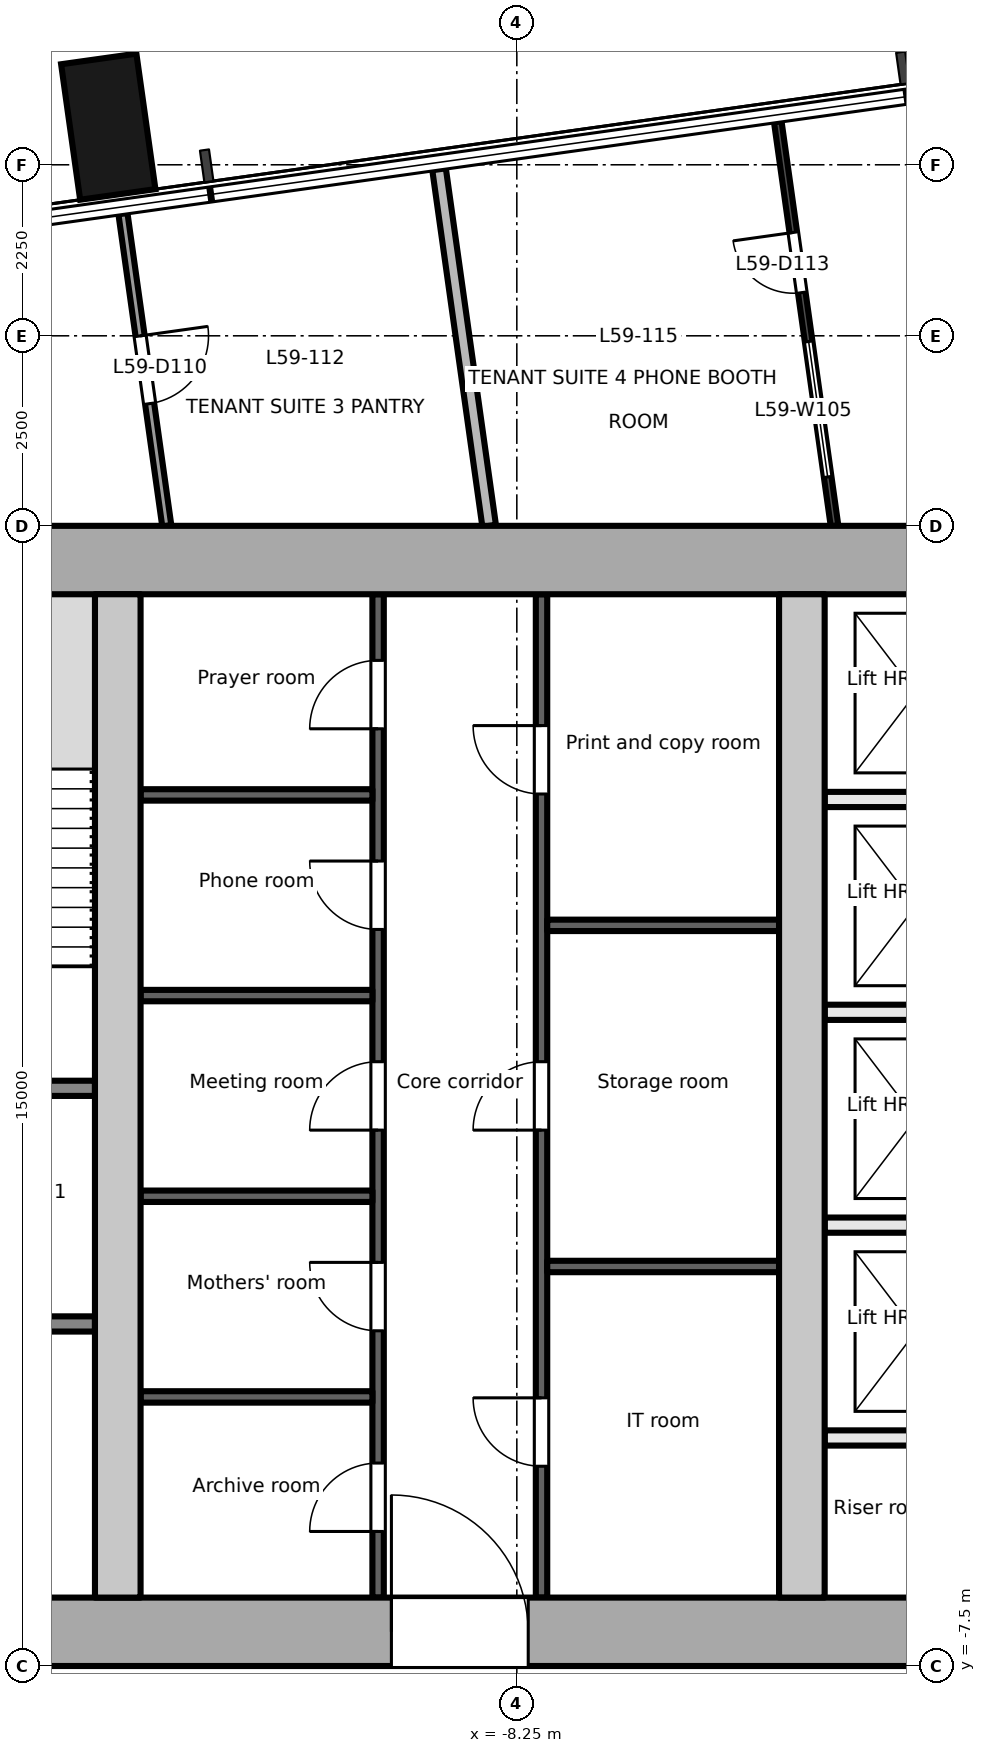
"""IFC4 building model, lengths in metres.
Left out: names, types, materials, properties, quantities, classifications, styles, units other than length and angle.
Written with IfcOpenShell. Run it as: python <this file> out.ifc"""

import sys

from ifc_helpers import new_model, si_unit, direction, frame, frame_2d, origin, origin_2d, place, context, subcontext, project, spatial, rectangle, extrude, element, fill, save


model = new_model("IFC4")
c1 = context("Model", 3, precision=1e-05, world=origin(), true_north=direction((0.0, 1.0)))
c2 = subcontext(c1, "Body", "Model", "MODEL_VIEW")
j1 = project(units=[si_unit("LENGTHUNIT", "METRE"), si_unit("PLANEANGLEUNIT", "RADIAN")], contexts=[c1])
p1 = place(None, origin())
s1 = spatial("IfcSite", under=j1, at=p1, CompositionType="ELEMENT")
p2 = place(p1, origin())
s2 = spatial("IfcBuilding", under=s1, at=p2, CompositionType="ELEMENT")
p3 = place(p2, frame((0.0, 0.0, 259.0)))
s3 = spatial("IfcBuildingStorey", under=s2, at=p3, CompositionType="ELEMENT", Elevation=259.0)
p4 = place(p3, frame((-13.625, 12.751, -0.2), z_axis=(0.0, 0.0, 1.0), x_axis=(0.990265639562, 0.139190384377, 0.0)))
e1 = element("IfcColumn", 1, at=p4, inside=s3, PredefinedType="COLUMN", context=c2, shape_type="SweptSolid", body=[
    extrude(rectangle(XDim=1.0, YDim=1.8, at=origin_2d()), origin(), (0.0, 0.0, 1.0), 3.9),
])
p5 = place(p3, frame((-18.0, -7.05, -0.2), z_axis=(0.0, 0.0, 1.0), x_axis=(1.0, 0.0, 0.0)))
e2 = element("IfcWall", 2, at=p5, inside=s3, PredefinedType="SHEAR", context=c2, shape_type="SweptSolid", body=[
    extrude(rectangle(XDim=36.0, YDim=0.9, at=frame_2d((18.0, 0.0))), origin(), (0.0, 0.0, 1.0), 3.9),
])
p6 = place(p5, frame((8.1, 0.0, 0.2)))
e3 = element("IfcOpeningElement", 3, at=p6, cuts=e2, PredefinedType="OPENING", context=c2, shape_type="SweptSolid", body=[
    extrude(rectangle(XDim=1.8, YDim=2.1, at=frame_2d((0.9, 1.05))), frame((0.0, 0.46, 0.0), z_axis=(0.0, -1.0, 0.0), x_axis=(1.0, 0.0, 0.0)), (0.0, 0.0, 1.0), 0.921),
])
p7 = place(p5, frame((16.8, 0.0, 0.2)))
e4 = element("IfcOpeningElement", 4, at=p7, cuts=e2, PredefinedType="OPENING", context=c2, shape_type="SweptSolid", body=[
    extrude(rectangle(XDim=2.4, YDim=2.1, at=frame_2d((1.2, 1.05))), frame((0.0, 0.46, 0.0), z_axis=(0.0, -1.0, 0.0), x_axis=(1.0, 0.0, 0.0)), (0.0, 0.0, 1.0), 0.921),
])
p8 = place(p5, frame((26.1, 0.0, 0.2)))
e5 = element("IfcOpeningElement", 5, at=p8, cuts=e2, PredefinedType="OPENING", context=c2, shape_type="SweptSolid", body=[
    extrude(rectangle(XDim=2.4, YDim=2.1, at=frame_2d((1.2, 1.05))), frame((0.0, 0.46, 0.0), z_axis=(0.0, -1.0, 0.0), x_axis=(1.0, 0.0, 0.0)), (0.0, 0.0, 1.0), 0.921),
])
p9 = place(p3, frame((-18.0, 7.05, -0.2), z_axis=(0.0, 0.0, 1.0), x_axis=(1.0, 0.0, 0.0)))
e6 = element("IfcWall", 6, at=p9, inside=s3, PredefinedType="SHEAR", context=c2, shape_type="SweptSolid", body=[
    extrude(rectangle(XDim=36.0, YDim=0.9, at=frame_2d((18.0, 0.0))), origin(), (0.0, 0.0, 1.0), 3.9),
])
for number, where, z_axis, x_axis in (
    (7, (-13.5, -6.6, -0.2), (0.0, 0.0, 1.0), (0.0, 1.0, 0.0)),
    (8, (-4.5, -6.6, -0.2), (0.0, 0.0, 1.0), (0.0, 1.0, 0.0)),
):
    element("IfcWall", number, at=place(p3, frame(where, z_axis=z_axis, x_axis=x_axis)), inside=s3, PredefinedType="SHEAR", context=c2, shape_type="SweptSolid", body=[
        extrude(rectangle(XDim=13.2, YDim=0.6, at=frame_2d((6.6, 0.0))), origin(), (0.0, 0.0, 1.0), 3.9),
    ])
p10 = place(p3, frame((-17.1, -3.0, 0.0), z_axis=(0.0, 0.0, 1.0), x_axis=(1.0, 0.0, 0.0)))
e9 = element("IfcWall", 9, at=p10, inside=s3, PredefinedType="PARTITIONING", context=c2, shape_type="SweptSolid", body=[
    extrude(rectangle(XDim=3.3, YDim=0.2, at=frame_2d((1.65, 0.0))), origin(), (0.0, 0.0, 1.0), 3.7),
])
p11 = place(p10, frame((1.1, 0.0, 0.0)))
e10 = element("IfcOpeningElement", 10, at=p11, cuts=e9, PredefinedType="OPENING", context=c2, shape_type="SweptSolid", body=[
    extrude(rectangle(XDim=1.1, YDim=2.1, at=frame_2d((0.55, 1.05))), frame((0.0, 0.111, 0.0), z_axis=(0.0, -1.0, 0.0), x_axis=(1.0, 0.0, 0.0)), (0.0, 0.0, 1.0), 0.221),
])
p12 = place(p3, frame((-17.1, 0.1, 0.0), z_axis=(0.0, 0.0, 1.0), x_axis=(1.0, 0.0, 0.0)))
e11 = element("IfcWall", 11, at=p12, inside=s3, PredefinedType="PARTITIONING", context=c2, shape_type="SweptSolid", body=[
    extrude(rectangle(XDim=3.3, YDim=0.2, at=frame_2d((1.65, 0.0))), origin(), (0.0, 0.0, 1.0), 3.7),
])
p13 = place(p12, frame((1.1, 0.0, 0.0)))
e12 = element("IfcOpeningElement", 12, at=p13, cuts=e11, PredefinedType="OPENING", context=c2, shape_type="SweptSolid", body=[
    extrude(rectangle(XDim=1.1, YDim=2.1, at=frame_2d((0.55, 1.05))), frame((0.0, 0.111, 0.0), z_axis=(0.0, -1.0, 0.0), x_axis=(1.0, 0.0, 0.0)), (0.0, 0.0, 1.0), 0.221),
])
p14 = place(p3, frame((-10.075, -6.6, 0.0), z_axis=(0.0, 0.0, 1.0), x_axis=(0.0, 1.0, 0.0)))
e13 = element("IfcWall", 13, at=p14, inside=s3, PredefinedType="PARTITIONING", context=c2, shape_type="SweptSolid", body=[
    extrude(rectangle(XDim=13.2, YDim=0.15, at=frame_2d((6.6, 0.0))), origin(), (0.0, 0.0, 1.0), 3.7),
])
p15 = place(p14, frame((0.87, 0.0, 0.0)))
e14 = element("IfcOpeningElement", 14, at=p15, cuts=e13, PredefinedType="OPENING", context=c2, shape_type="SweptSolid", body=[
    extrude(rectangle(XDim=0.9, YDim=2.1, at=frame_2d((0.45, 1.05))), frame((0.0, 0.085, 0.0), z_axis=(0.0, -1.0, 0.0), x_axis=(1.0, 0.0, 0.0)), (0.0, 0.0, 1.0), 0.171),
])
p16 = place(p14, frame((3.51, 0.0, 0.0)))
e15 = element("IfcOpeningElement", 15, at=p16, cuts=e13, PredefinedType="OPENING", context=c2, shape_type="SweptSolid", body=[
    extrude(rectangle(XDim=0.9, YDim=2.1, at=frame_2d((0.45, 1.05))), frame((0.0, 0.085, 0.0), z_axis=(0.0, -1.0, 0.0), x_axis=(1.0, 0.0, 0.0)), (0.0, 0.0, 1.0), 0.171),
])
p17 = place(p14, frame((6.15, 0.0, 0.0)))
e16 = element("IfcOpeningElement", 16, at=p17, cuts=e13, PredefinedType="OPENING", context=c2, shape_type="SweptSolid", body=[
    extrude(rectangle(XDim=0.9, YDim=2.1, at=frame_2d((0.45, 1.05))), frame((0.0, 0.085, 0.0), z_axis=(0.0, -1.0, 0.0), x_axis=(1.0, 0.0, 0.0)), (0.0, 0.0, 1.0), 0.171),
])
p18 = place(p14, frame((8.79, 0.0, 0.0)))
e17 = element("IfcOpeningElement", 17, at=p18, cuts=e13, PredefinedType="OPENING", context=c2, shape_type="SweptSolid", body=[
    extrude(rectangle(XDim=0.9, YDim=2.1, at=frame_2d((0.45, 1.05))), frame((0.0, 0.085, 0.0), z_axis=(0.0, -1.0, 0.0), x_axis=(1.0, 0.0, 0.0)), (0.0, 0.0, 1.0), 0.171),
])
p19 = place(p14, frame((11.43, 0.0, 0.0)))
e18 = element("IfcOpeningElement", 18, at=p19, cuts=e13, PredefinedType="OPENING", context=c2, shape_type="SweptSolid", body=[
    extrude(rectangle(XDim=0.9, YDim=2.1, at=frame_2d((0.45, 1.05))), frame((0.0, 0.085, 0.0), z_axis=(0.0, -1.0, 0.0), x_axis=(1.0, 0.0, 0.0)), (0.0, 0.0, 1.0), 0.171),
])
for number, where, z_axis, x_axis in (
    (19, (-13.2, -3.96, 0.0), (0.0, 0.0, 1.0), (1.0, 0.0, 0.0)),
    (20, (-13.2, -1.32, 0.0), (0.0, 0.0, 1.0), (1.0, 0.0, 0.0)),
    (21, (-13.2, 1.32, 0.0), (0.0, 0.0, 1.0), (1.0, 0.0, 0.0)),
    (22, (-13.2, 3.96, 0.0), (0.0, 0.0, 1.0), (1.0, 0.0, 0.0)),
):
    element("IfcWall", number, at=place(p3, frame(where, z_axis=z_axis, x_axis=x_axis)), inside=s3, PredefinedType="PARTITIONING", context=c2, shape_type="SweptSolid", body=[
        extrude(rectangle(XDim=3.05, YDim=0.15, at=frame_2d((1.525, 0.0))), origin(), (0.0, 0.0, 1.0), 3.7),
    ])
p20 = place(p3, frame((-7.925, -6.6, 0.0), z_axis=(0.0, 0.0, 1.0), x_axis=(0.0, 1.0, 0.0)))
e23 = element("IfcWall", 23, at=p20, inside=s3, PredefinedType="PARTITIONING", context=c2, shape_type="SweptSolid", body=[
    extrude(rectangle(XDim=13.2, YDim=0.15, at=frame_2d((6.6, 0.0))), origin(), (0.0, 0.0, 1.0), 3.7),
])
p21 = place(p20, frame((1.728, 0.0, 0.0)))
e24 = element("IfcOpeningElement", 24, at=p21, cuts=e23, PredefinedType="OPENING", context=c2, shape_type="SweptSolid", body=[
    extrude(rectangle(XDim=0.9, YDim=2.1, at=frame_2d((0.45, 1.05))), frame((0.0, 0.085, 0.0), z_axis=(0.0, -1.0, 0.0), x_axis=(1.0, 0.0, 0.0)), (0.0, 0.0, 1.0), 0.171),
])
p22 = place(p20, frame((6.15, 0.0, 0.0)))
e25 = element("IfcOpeningElement", 25, at=p22, cuts=e23, PredefinedType="OPENING", context=c2, shape_type="SweptSolid", body=[
    extrude(rectangle(XDim=0.9, YDim=2.1, at=frame_2d((0.45, 1.05))), frame((0.0, 0.085, 0.0), z_axis=(0.0, -1.0, 0.0), x_axis=(1.0, 0.0, 0.0)), (0.0, 0.0, 1.0), 0.171),
])
p23 = place(p20, frame((10.572, 0.0, 0.0)))
e26 = element("IfcOpeningElement", 26, at=p23, cuts=e23, PredefinedType="OPENING", context=c2, shape_type="SweptSolid", body=[
    extrude(rectangle(XDim=0.9, YDim=2.1, at=frame_2d((0.45, 1.05))), frame((0.0, 0.085, 0.0), z_axis=(0.0, -1.0, 0.0), x_axis=(1.0, 0.0, 0.0)), (0.0, 0.0, 1.0), 0.171),
])
for number, where, z_axis, x_axis in (
    (27, (-7.85, -2.244, 0.0), (0.0, 0.0, 1.0), (1.0, 0.0, 0.0)),
    (28, (-7.85, 2.244, 0.0), (0.0, 0.0, 1.0), (1.0, 0.0, 0.0)),
):
    element("IfcWall", number, at=place(p3, frame(where, z_axis=z_axis, x_axis=x_axis)), inside=s3, PredefinedType="PARTITIONING", context=c2, shape_type="SweptSolid", body=[
        extrude(rectangle(XDim=3.05, YDim=0.15, at=frame_2d((1.525, 0.0))), origin(), (0.0, 0.0, 1.0), 3.7),
    ])
for number, where, z_axis, x_axis in (
    (29, (-4.2, -1.7, 0.0), (0.0, 0.0, 1.0), (1.0, 0.0, 0.0)),
    (30, (-4.2, 1.1, 0.0), (0.0, 0.0, 1.0), (1.0, 0.0, 0.0)),
    (31, (-4.2, 3.9, 0.0), (0.0, 0.0, 1.0), (1.0, 0.0, 0.0)),
    (32, (-4.2, -4.5, 0.0), (0.0, 0.0, 1.0), (1.0, 0.0, 0.0)),
):
    element("IfcWall", number, at=place(p3, frame(where, z_axis=z_axis, x_axis=x_axis)), inside=s3, PredefinedType="PARTITIONING", context=c2, shape_type="SweptSolid", body=[
        extrude(rectangle(XDim=2.3, YDim=0.2, at=frame_2d((1.15, 0.0))), origin(), (0.0, 0.0, 1.0), 3.7),
    ])
p24 = place(p3, frame((-13.432, 11.607, 0.0), z_axis=(0.0, 0.0, 1.0), x_axis=(0.139105101842, -0.990277623014, 0.0)))
e33 = element("IfcWall", 33, at=p24, inside=s3, PredefinedType="PARTITIONING", context=c2, shape_type="SweptSolid", body=[
    extrude(rectangle(XDim=4.147, YDim=0.12, at=frame_2d((2.074, 0.0))), origin(), (0.0, 0.0, 1.0), 3.4),
])
p25 = place(p24, frame((1.624, 0.0, 0.0)))
e34 = element("IfcOpeningElement", 34, at=p25, cuts=e33, PredefinedType="OPENING", context=c2, shape_type="SweptSolid", body=[
    extrude(rectangle(XDim=0.9, YDim=2.1, at=frame_2d((0.45, 1.05))), frame((0.0, 0.071, 0.0), z_axis=(0.0, -1.0, 0.0), x_axis=(1.0, 0.0, 0.0)), (0.0, 0.0, 1.0), 0.141),
])
p26 = place(p3, frame((-9.273, 12.191, 0.0), z_axis=(0.0, 0.0, 1.0), x_axis=(0.139104789371, -0.990277666907, 0.0)))
e35 = element("IfcWall", 35, at=p26, inside=s3, PredefinedType="PARTITIONING", context=c2, shape_type="SweptSolid", body=[
    extrude(rectangle(XDim=4.737, YDim=0.18, at=frame_2d((2.369, 0.0))), origin(), (0.0, 0.0, 1.0), 3.4),
])
p27 = place(p3, frame((-4.07, 7.5, 0.0), z_axis=(0.0, 0.0, 1.0), x_axis=(-0.139122430522, 0.990275188685, 0.0)))
e36 = element("IfcWall", 36, at=p27, inside=s3, PredefinedType="PARTITIONING", context=c2, shape_type="SweptSolid", body=[
    extrude(rectangle(XDim=5.368, YDim=0.1, at=frame_2d((2.684, 0.0))), origin(), (0.0, 0.0, 1.0), 3.4),
])
p28 = place(p27, frame((3.098, 0.0, 0.0)))
e37 = element("IfcOpeningElement", 37, at=p28, cuts=e36, PredefinedType="OPENING", context=c2, shape_type="SweptSolid", body=[
    extrude(rectangle(XDim=0.8, YDim=2.1, at=frame_2d((0.4, 1.05))), frame((0.0, 0.061, 0.0), z_axis=(0.0, -1.0, 0.0), x_axis=(1.0, 0.0, 0.0)), (0.0, 0.0, 1.0), 0.121),
])
p29 = place(p27, frame((0.649, 0.0, 0.9)))
e38 = element("IfcOpeningElement", 38, at=p29, cuts=e36, PredefinedType="OPENING", context=c2, shape_type="SweptSolid", body=[
    extrude(rectangle(XDim=1.8, YDim=1.2, at=frame_2d((0.9, 0.6))), frame((0.0, 0.061, 0.0), z_axis=(0.0, -1.0, 0.0), x_axis=(1.0, 0.0, 0.0)), (0.0, 0.0, 1.0), 0.121),
])
p30 = place(p15, origin())
e39 = element("IfcDoor", 39, at=p30, inside=s3, OperationType="SINGLE_SWING_LEFT", PredefinedType="DOOR", context=c2, shape_type="SweptSolid", body=[
    extrude(rectangle(XDim=0.9, YDim=2.1, at=frame_2d((0.45, 1.05))), frame((0.0, 0.025, 0.0), z_axis=(0.0, -1.0, 0.0), x_axis=(1.0, 0.0, 0.0)), (0.0, 0.0, 1.0), 0.05),
])
fill(e14, e39)
p31 = place(p16, origin())
e40 = element("IfcDoor", 40, at=p31, inside=s3, OperationType="SINGLE_SWING_RIGHT", PredefinedType="DOOR", context=c2, shape_type="SweptSolid", body=[
    extrude(rectangle(XDim=0.9, YDim=2.1, at=frame_2d((0.45, 1.05))), frame((0.0, 0.025, 0.0), z_axis=(0.0, -1.0, 0.0), x_axis=(1.0, 0.0, 0.0)), (0.0, 0.0, 1.0), 0.05),
])
fill(e15, e40)
p32 = place(p17, origin())
e41 = element("IfcDoor", 41, at=p32, inside=s3, OperationType="SINGLE_SWING_LEFT", PredefinedType="DOOR", context=c2, shape_type="SweptSolid", body=[
    extrude(rectangle(XDim=0.9, YDim=2.1, at=frame_2d((0.45, 1.05))), frame((0.0, 0.025, 0.0), z_axis=(0.0, -1.0, 0.0), x_axis=(1.0, 0.0, 0.0)), (0.0, 0.0, 1.0), 0.05),
])
fill(e16, e41)
p33 = place(p18, origin())
e42 = element("IfcDoor", 42, at=p33, inside=s3, OperationType="SINGLE_SWING_RIGHT", PredefinedType="DOOR", context=c2, shape_type="SweptSolid", body=[
    extrude(rectangle(XDim=0.9, YDim=2.1, at=frame_2d((0.45, 1.05))), frame((0.0, 0.025, 0.0), z_axis=(0.0, -1.0, 0.0), x_axis=(1.0, 0.0, 0.0)), (0.0, 0.0, 1.0), 0.05),
])
fill(e17, e42)
p34 = place(p19, origin())
e43 = element("IfcDoor", 43, at=p34, inside=s3, OperationType="SINGLE_SWING_LEFT", PredefinedType="DOOR", context=c2, shape_type="SweptSolid", body=[
    extrude(rectangle(XDim=0.9, YDim=2.1, at=frame_2d((0.45, 1.05))), frame((0.0, 0.025, 0.0), z_axis=(0.0, -1.0, 0.0), x_axis=(1.0, 0.0, 0.0)), (0.0, 0.0, 1.0), 0.05),
])
fill(e18, e43)
p35 = place(p21, origin())
e44 = element("IfcDoor", 44, at=p35, inside=s3, OperationType="SINGLE_SWING_RIGHT", PredefinedType="DOOR", context=c2, shape_type="SweptSolid", body=[
    extrude(rectangle(XDim=0.9, YDim=2.1, at=frame_2d((0.45, 1.05))), frame((0.0, 0.025, 0.0), z_axis=(0.0, -1.0, 0.0), x_axis=(1.0, 0.0, 0.0)), (0.0, 0.0, 1.0), 0.05),
])
fill(e24, e44)
p36 = place(p22, origin())
e45 = element("IfcDoor", 45, at=p36, inside=s3, OperationType="SINGLE_SWING_LEFT", PredefinedType="DOOR", context=c2, shape_type="SweptSolid", body=[
    extrude(rectangle(XDim=0.9, YDim=2.1, at=frame_2d((0.45, 1.05))), frame((0.0, 0.025, 0.0), z_axis=(0.0, -1.0, 0.0), x_axis=(1.0, 0.0, 0.0)), (0.0, 0.0, 1.0), 0.05),
])
fill(e25, e45)
p37 = place(p23, origin())
e46 = element("IfcDoor", 46, at=p37, inside=s3, OperationType="SINGLE_SWING_RIGHT", PredefinedType="DOOR", context=c2, shape_type="SweptSolid", body=[
    extrude(rectangle(XDim=0.9, YDim=2.1, at=frame_2d((0.45, 1.05))), frame((0.0, 0.025, 0.0), z_axis=(0.0, -1.0, 0.0), x_axis=(1.0, 0.0, 0.0)), (0.0, 0.0, 1.0), 0.05),
])
fill(e26, e46)
p38 = place(p6, origin())
e47 = element("IfcDoor", 47, at=p38, inside=s3, OperationType="SINGLE_SWING_LEFT", PredefinedType="DOOR", context=c2, shape_type="SweptSolid", body=[
    extrude(rectangle(XDim=1.8, YDim=2.1, at=frame_2d((0.9, 1.05))), frame((0.0, 0.025, 0.0), z_axis=(0.0, -1.0, 0.0), x_axis=(1.0, 0.0, 0.0)), (0.0, 0.0, 1.0), 0.05),
])
fill(e3, e47)
p39 = place(p25, origin())
e48 = element("IfcDoor", 48, at=p39, inside=s3, OperationType="SINGLE_SWING_LEFT", PredefinedType="DOOR", context=c2, shape_type="SweptSolid", body=[
    extrude(rectangle(XDim=0.9, YDim=2.1, at=frame_2d((0.45, 1.05))), frame((0.0, 0.025, 0.0), z_axis=(0.0, -1.0, 0.0), x_axis=(1.0, 0.0, 0.0)), (0.0, 0.0, 1.0), 0.05),
])
fill(e34, e48)
p40 = place(p28, origin())
e49 = element("IfcDoor", 49, at=p40, inside=s3, OperationType="SINGLE_SWING_RIGHT", PredefinedType="DOOR", context=c2, shape_type="SweptSolid", body=[
    extrude(rectangle(XDim=0.8, YDim=2.1, at=frame_2d((0.4, 1.05))), frame((0.0, 0.025, 0.0), z_axis=(0.0, -1.0, 0.0), x_axis=(1.0, 0.0, 0.0)), (0.0, 0.0, 1.0), 0.05),
])
fill(e37, e49)
p41 = place(p29, origin())
e50 = element("IfcWindow", 50, at=p41, inside=s3, PartitioningType="SINGLE_PANEL", PredefinedType="WINDOW", context=c2, shape_type="SweptSolid", body=[
    extrude(rectangle(XDim=1.8, YDim=1.2, at=frame_2d((0.9, 0.6))), frame((0.0, 0.03, 0.0), z_axis=(0.0, -1.0, 0.0), x_axis=(1.0, 0.0, 0.0)), (0.0, 0.0, 1.0), 0.06),
])
fill(e38, e50)
save(model, sys.argv[1])
